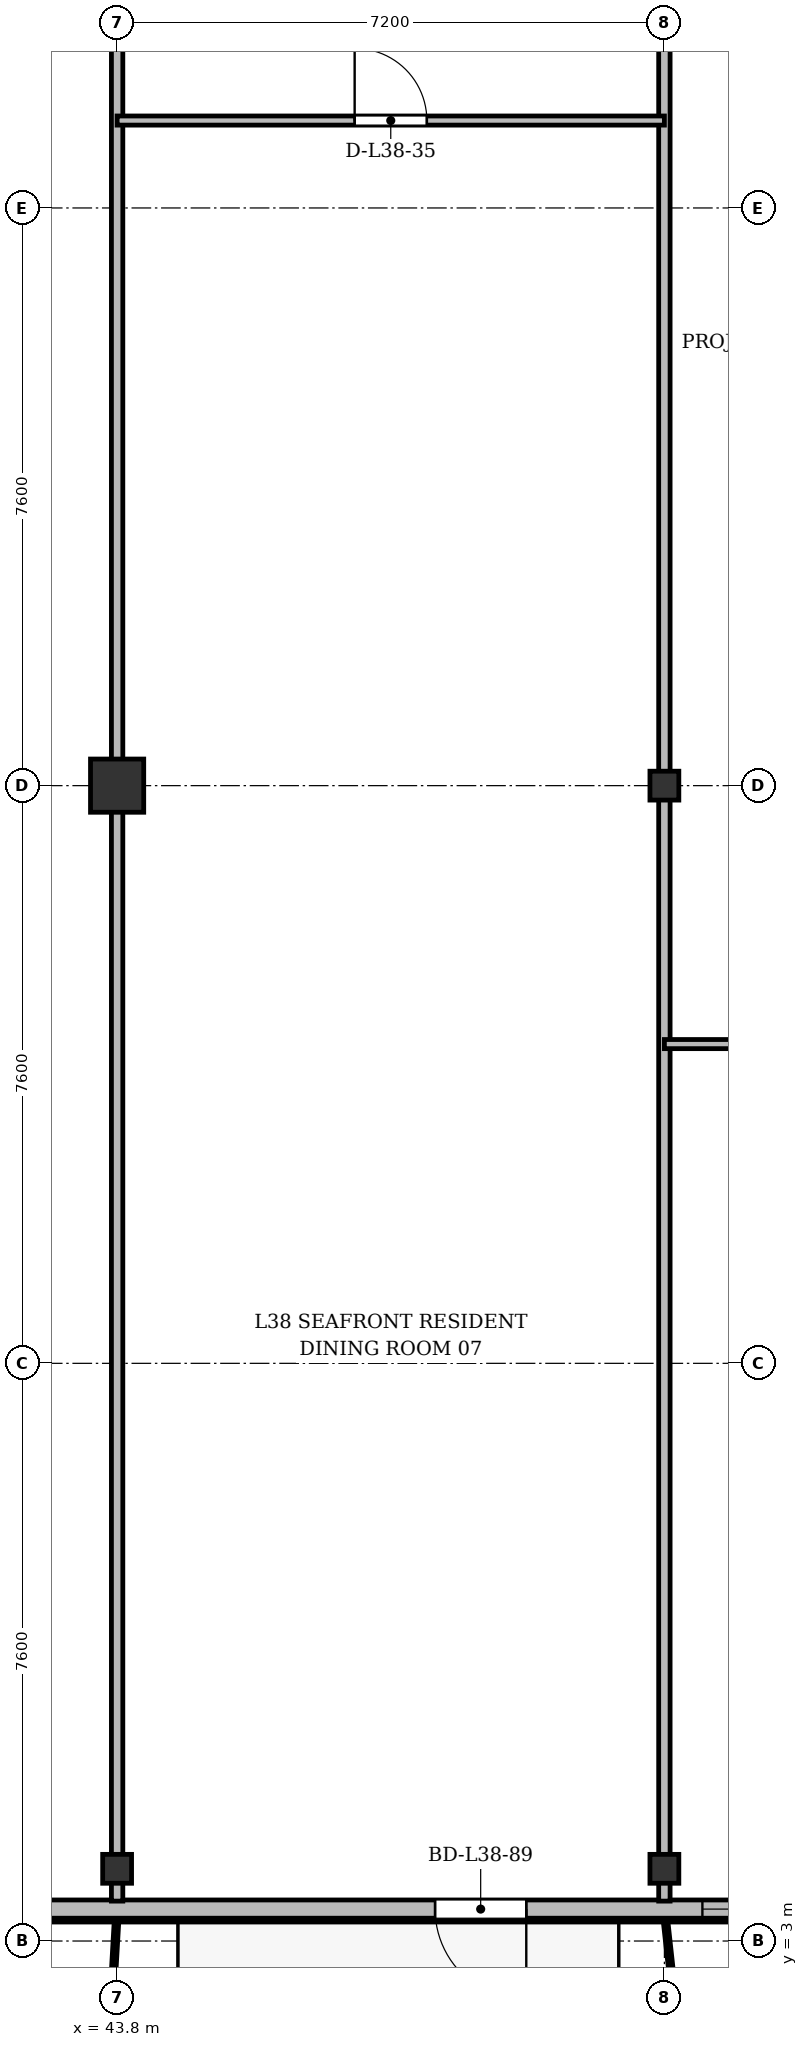
"""IFC4 building model, lengths in metres.
Left out: names, types, materials, properties, quantities, classifications, styles, units other than length and angle.
Written with IfcOpenShell. Run it as: python <this file> out.ifc"""

import sys

from ifc_helpers import new_model, si_unit, direction, frame, frame_2d, origin, origin_2d, place, context, subcontext, project, spatial, rectangle, i_section, extrude, source, transform, mapped, element, fill, save


model = new_model("IFC4")
c1 = context("Model", 3, precision=1e-05, world=origin(), true_north=direction((0.0, 1.0)))
c2 = subcontext(c1, "Body", "Model", "MODEL_VIEW")
j1 = project(units=[si_unit("LENGTHUNIT", "METRE"), si_unit("PLANEANGLEUNIT", "RADIAN")], contexts=[c1])
p1 = place(None, origin())
s1 = spatial("IfcSite", under=j1, at=p1, CompositionType="ELEMENT")
p2 = place(p1, origin())
s2 = spatial("IfcBuilding", under=s1, at=p2, CompositionType="ELEMENT")
p3 = place(p2, frame((0.0, 0.0, 146.5)))
s3 = spatial("IfcBuildingStorey", under=s2, at=p3, CompositionType="ELEMENT", Elevation=146.5)
m1 = source(origin(), c2, "Body", "SweptSolid", [
    extrude(i_section(OverallWidth=0.38, OverallDepth=0.38, WebThickness=0.02, FlangeThickness=0.03, at=origin_2d()), origin(), (0.0, 0.0, 1.0), 3.6),
])
p4 = place(p3, frame((43.8, 3.95, 0.0), z_axis=(0.0, 0.0, 1.0), x_axis=(1.0, 0.0, 0.0)))
e1 = element("IfcColumn", 1, at=p4, inside=s3, PredefinedType="COLUMN", context=c2, shape_type="MappedRepresentation", body=[
    mapped(m1, transform((0.0, 0.0, 0.0), x_axis=(1.0, 0.0, 0.0), y_axis=(0.0, 1.0, 0.0), z_axis=(0.0, 0.0, 1.0), scale=1.0)),
])
m2 = source(origin(), c2, "Body", "SweptSolid", [
    extrude(rectangle(XDim=0.7, YDim=0.7, at=origin_2d()), origin(), (0.0, 0.0, 1.0), 3.6),
])
p5 = place(p3, frame((43.8, 18.2, 0.0), z_axis=(0.0, 0.0, 1.0), x_axis=(1.0, 0.0, 0.0)))
e2 = element("IfcColumn", 2, at=p5, inside=s3, PredefinedType="COLUMN", context=c2, shape_type="MappedRepresentation", body=[
    mapped(m2, transform((0.0, 0.0, 0.0), x_axis=(1.0, 0.0, 0.0), y_axis=(0.0, 1.0, 0.0), z_axis=(0.0, 0.0, 1.0), scale=1.0)),
])
for number, where, z_axis, x_axis in (
    (3, (51.0, 3.95, 0.0), (0.0, 0.0, 1.0), (1.0, 0.0, 0.0)),
    (4, (51.0, 18.2, 0.0), (0.0, 0.0, 1.0), (1.0, 0.0, 0.0)),
):
    element("IfcColumn", number, at=place(p3, frame(where, z_axis=z_axis, x_axis=x_axis)), inside=s3, PredefinedType="COLUMN", context=c2, shape_type="MappedRepresentation", body=[
        mapped(m1, transform((0.0, 0.0, 0.0), x_axis=(1.0, 0.0, 0.0), y_axis=(0.0, 1.0, 0.0), z_axis=(0.0, 0.0, 1.0), scale=1.0)),
    ])
p6 = place(p3, frame((63.6, 3.42, 0.0), z_axis=(0.0, 0.0, 1.0), x_axis=(-1.0, 0.0, 0.0)))
e5 = element("IfcWall", 5, at=p6, inside=s3, PredefinedType="SOLIDWALL", context=c2, shape_type="SweptSolid", body=[
    extrude(rectangle(XDim=52.8, YDim=0.24, at=frame_2d((26.4, 0.0))), origin(), (0.0, 0.0, 1.0), 3.35),
])
p7 = place(p6, frame((1.445, 0.0, 0.9)))
e6 = element("IfcOpeningElement", 6, at=p7, cuts=e5, PredefinedType="OPENING", context=c2, shape_type="SweptSolid", body=[
    extrude(rectangle(XDim=2.0, YDim=1.95, at=frame_2d((1.0, 0.975))), frame((0.0, 0.13, 0.0), z_axis=(0.0, -1.0, 0.0), x_axis=(1.0, 0.0, 0.0)), (0.0, 0.0, 1.0), 0.26),
])
p8 = place(p6, frame((5.275, 0.0, 0.9)))
e7 = element("IfcOpeningElement", 7, at=p8, cuts=e5, PredefinedType="OPENING", context=c2, shape_type="SweptSolid", body=[
    extrude(rectangle(XDim=1.65, YDim=1.85, at=frame_2d((0.825, 0.925))), frame((0.0, 0.13, 0.0), z_axis=(0.0, -1.0, 0.0), x_axis=(1.0, 0.0, 0.0)), (0.0, 0.0, 1.0), 0.26),
])
p9 = place(p6, frame((7.65, 0.0, 0.9)))
e8 = element("IfcOpeningElement", 8, at=p9, cuts=e5, PredefinedType="OPENING", context=c2, shape_type="SweptSolid", body=[
    extrude(rectangle(XDim=1.5, YDim=1.75, at=frame_2d((0.75, 0.875))), frame((0.0, 0.13, 0.0), z_axis=(0.0, -1.0, 0.0), x_axis=(1.0, 0.0, 0.0)), (0.0, 0.0, 1.0), 0.26),
])
p10 = place(p6, frame((9.9, 0.0, 0.9)))
e9 = element("IfcOpeningElement", 9, at=p10, cuts=e5, PredefinedType="OPENING", context=c2, shape_type="SweptSolid", body=[
    extrude(rectangle(XDim=2.2, YDim=1.8, at=frame_2d((1.1, 0.9))), frame((0.0, 0.13, 0.0), z_axis=(0.0, -1.0, 0.0), x_axis=(1.0, 0.0, 0.0)), (0.0, 0.0, 1.0), 0.26),
])
p11 = place(p6, frame((14.417, 0.0, 0.0)))
e10 = element("IfcOpeningElement", 10, at=p11, cuts=e5, PredefinedType="OPENING", context=c2, shape_type="SweptSolid", body=[
    extrude(rectangle(XDim=1.2, YDim=2.2, at=frame_2d((0.6, 1.1))), frame((0.0, 0.13, 0.0), z_axis=(0.0, -1.0, 0.0), x_axis=(1.0, 0.0, 0.0)), (0.0, 0.0, 1.0), 0.26),
])
p12 = place(p6, frame((25.4, 0.0, 0.9)))
e11 = element("IfcOpeningElement", 11, at=p12, cuts=e5, PredefinedType="OPENING", context=c2, shape_type="SweptSolid", body=[
    extrude(rectangle(XDim=2.0, YDim=1.95, at=frame_2d((1.0, 0.975))), frame((0.0, 0.13, 0.0), z_axis=(0.0, -1.0, 0.0), x_axis=(1.0, 0.0, 0.0)), (0.0, 0.0, 1.0), 0.26),
])
p13 = place(p6, frame((35.775, 0.0, 0.9)))
e12 = element("IfcOpeningElement", 12, at=p13, cuts=e5, PredefinedType="OPENING", context=c2, shape_type="SweptSolid", body=[
    extrude(rectangle(XDim=1.65, YDim=1.85, at=frame_2d((0.825, 0.925))), frame((0.0, 0.13, 0.0), z_axis=(0.0, -1.0, 0.0), x_axis=(1.0, 0.0, 0.0)), (0.0, 0.0, 1.0), 0.26),
])
p14 = place(p6, frame((41.656, 0.0, 0.0)))
e13 = element("IfcOpeningElement", 13, at=p14, cuts=e5, PredefinedType="OPENING", context=c2, shape_type="SweptSolid", body=[
    extrude(rectangle(XDim=1.2, YDim=2.2, at=frame_2d((0.6, 1.1))), frame((0.0, 0.13, 0.0), z_axis=(0.0, -1.0, 0.0), x_axis=(1.0, 0.0, 0.0)), (0.0, 0.0, 1.0), 0.26),
])
p15 = place(p6, frame((43.65, 0.0, 0.9)))
e14 = element("IfcOpeningElement", 14, at=p15, cuts=e5, PredefinedType="OPENING", context=c2, shape_type="SweptSolid", body=[
    extrude(rectangle(XDim=1.5, YDim=1.75, at=frame_2d((0.75, 0.875))), frame((0.0, 0.13, 0.0), z_axis=(0.0, -1.0, 0.0), x_axis=(1.0, 0.0, 0.0)), (0.0, 0.0, 1.0), 0.26),
])
p16 = place(p6, frame((45.95, 0.0, 0.9)))
e15 = element("IfcOpeningElement", 15, at=p16, cuts=e5, PredefinedType="OPENING", context=c2, shape_type="SweptSolid", body=[
    extrude(rectangle(XDim=1.5, YDim=1.75, at=frame_2d((0.75, 0.875))), frame((0.0, 0.13, 0.0), z_axis=(0.0, -1.0, 0.0), x_axis=(1.0, 0.0, 0.0)), (0.0, 0.0, 1.0), 0.26),
])
p17 = place(p6, frame((49.355, 0.0, 0.9)))
e16 = element("IfcOpeningElement", 16, at=p17, cuts=e5, PredefinedType="OPENING", context=c2, shape_type="SweptSolid", body=[
    extrude(rectangle(XDim=2.0, YDim=1.95, at=frame_2d((1.0, 0.975))), frame((0.0, 0.13, 0.0), z_axis=(0.0, -1.0, 0.0), x_axis=(1.0, 0.0, 0.0)), (0.0, 0.0, 1.0), 0.26),
])
for number, where, z_axis, x_axis in (
    (17, (43.8, 3.525, 0.0), (0.0, 0.0, 1.0), (0.0, 1.0, 0.0)),
    (18, (51.0, 3.525, 0.0), (0.0, 0.0, 1.0), (0.0, 1.0, 0.0)),
):
    element("IfcWall", number, at=place(p3, frame(where, z_axis=z_axis, x_axis=x_axis)), inside=s3, PredefinedType="PARTITIONING", context=c2, shape_type="SweptSolid", body=[
        extrude(rectangle(XDim=27.275, YDim=0.15, at=frame_2d((13.638, 0.0))), origin(), (0.0, 0.0, 1.0), 2.85),
    ])
p18 = place(p3, frame((43.8, 26.95, 0.0), z_axis=(0.0, 0.0, 1.0), x_axis=(1.0, 0.0, 0.0)))
e19 = element("IfcWall", 19, at=p18, inside=s3, PredefinedType="PARTITIONING", context=c2, shape_type="SweptSolid", body=[
    extrude(rectangle(XDim=7.2, YDim=0.12, at=frame_2d((3.6, 0.0))), origin(), (0.0, 0.0, 1.0), 2.85),
])
p19 = place(p18, frame((3.125, 0.0, 0.0)))
e20 = element("IfcOpeningElement", 20, at=p19, cuts=e19, PredefinedType="OPENING", context=c2, shape_type="SweptSolid", body=[
    extrude(rectangle(XDim=0.95, YDim=2.15, at=frame_2d((0.475, 1.075))), frame((0.0, 0.07, 0.0), z_axis=(0.0, -1.0, 0.0), x_axis=(1.0, 0.0, 0.0)), (0.0, 0.0, 1.0), 0.14),
])
p20 = place(p3, frame((51.0, 14.8, 0.0), z_axis=(0.0, 0.0, 1.0), x_axis=(1.0, 0.0, 0.0)))
e21 = element("IfcWall", 21, at=p20, inside=s3, PredefinedType="PARTITIONING", context=c2, shape_type="SweptSolid", body=[
    extrude(rectangle(XDim=3.2, YDim=0.12, at=frame_2d((1.6, 0.0))), origin(), (0.0, 0.0, 1.0), 2.85),
])
p21 = place(p20, frame((1.125, 0.0, 0.0)))
e22 = element("IfcOpeningElement", 22, at=p21, cuts=e21, PredefinedType="OPENING", context=c2, shape_type="SweptSolid", body=[
    extrude(rectangle(XDim=0.95, YDim=2.15, at=frame_2d((0.475, 1.075))), frame((0.0, 0.07, 0.0), z_axis=(0.0, -1.0, 0.0), x_axis=(1.0, 0.0, 0.0)), (0.0, 0.0, 1.0), 0.14),
])
m3 = source(origin(), c2, "Body", "SweptSolid", [
    extrude(rectangle(XDim=2.2, YDim=1.8, at=frame_2d((1.1, 0.9))), frame((0.0, 0.03, 0.0), z_axis=(0.0, -1.0, 0.0), x_axis=(1.0, 0.0, 0.0)), (0.0, 0.0, 1.0), 0.06),
])
p22 = place(p10, origin())
e23 = element("IfcWindow", 23, at=p22, inside=s3, PartitioningType="SINGLE_PANEL", PredefinedType="WINDOW", context=c2, shape_type="MappedRepresentation", body=[
    mapped(m3, transform((0.0, 0.0, 0.0), x_axis=(1.0, 0.0, 0.0), y_axis=(0.0, 1.0, 0.0), z_axis=(0.0, 0.0, 1.0), scale=1.0)),
])
fill(e9, e23)
m4 = source(origin(), c2, "Body", "SweptSolid", [
    extrude(rectangle(XDim=1.2, YDim=2.2, at=frame_2d((0.6, 1.1))), frame((0.0, 0.025, 0.0), z_axis=(0.0, -1.0, 0.0), x_axis=(1.0, 0.0, 0.0)), (0.0, 0.0, 1.0), 0.05),
])
p23 = place(p11, origin())
e24 = element("IfcDoor", 24, at=p23, inside=s3, OperationType="SINGLE_SWING_LEFT", PredefinedType="DOOR", context=c2, shape_type="MappedRepresentation", body=[
    mapped(m4, transform((0.0, 0.0, 0.0), x_axis=(1.0, 0.0, 0.0), y_axis=(0.0, 1.0, 0.0), z_axis=(0.0, 0.0, 1.0), scale=1.0)),
])
fill(e10, e24)
m5 = source(origin(), c2, "Body", "SweptSolid", [
    extrude(rectangle(XDim=0.95, YDim=2.15, at=frame_2d((0.475, 1.075))), frame((0.0, 0.025, 0.0), z_axis=(0.0, -1.0, 0.0), x_axis=(1.0, 0.0, 0.0)), (0.0, 0.0, 1.0), 0.05),
])
p24 = place(p19, origin())
e25 = element("IfcDoor", 25, at=p24, inside=s3, OperationType="SINGLE_SWING_LEFT", PredefinedType="DOOR", context=c2, shape_type="MappedRepresentation", body=[
    mapped(m5, transform((0.0, 0.0, 0.0), x_axis=(1.0, 0.0, 0.0), y_axis=(0.0, 1.0, 0.0), z_axis=(0.0, 0.0, 1.0), scale=1.0)),
])
fill(e20, e25)
save(model, sys.argv[1])
